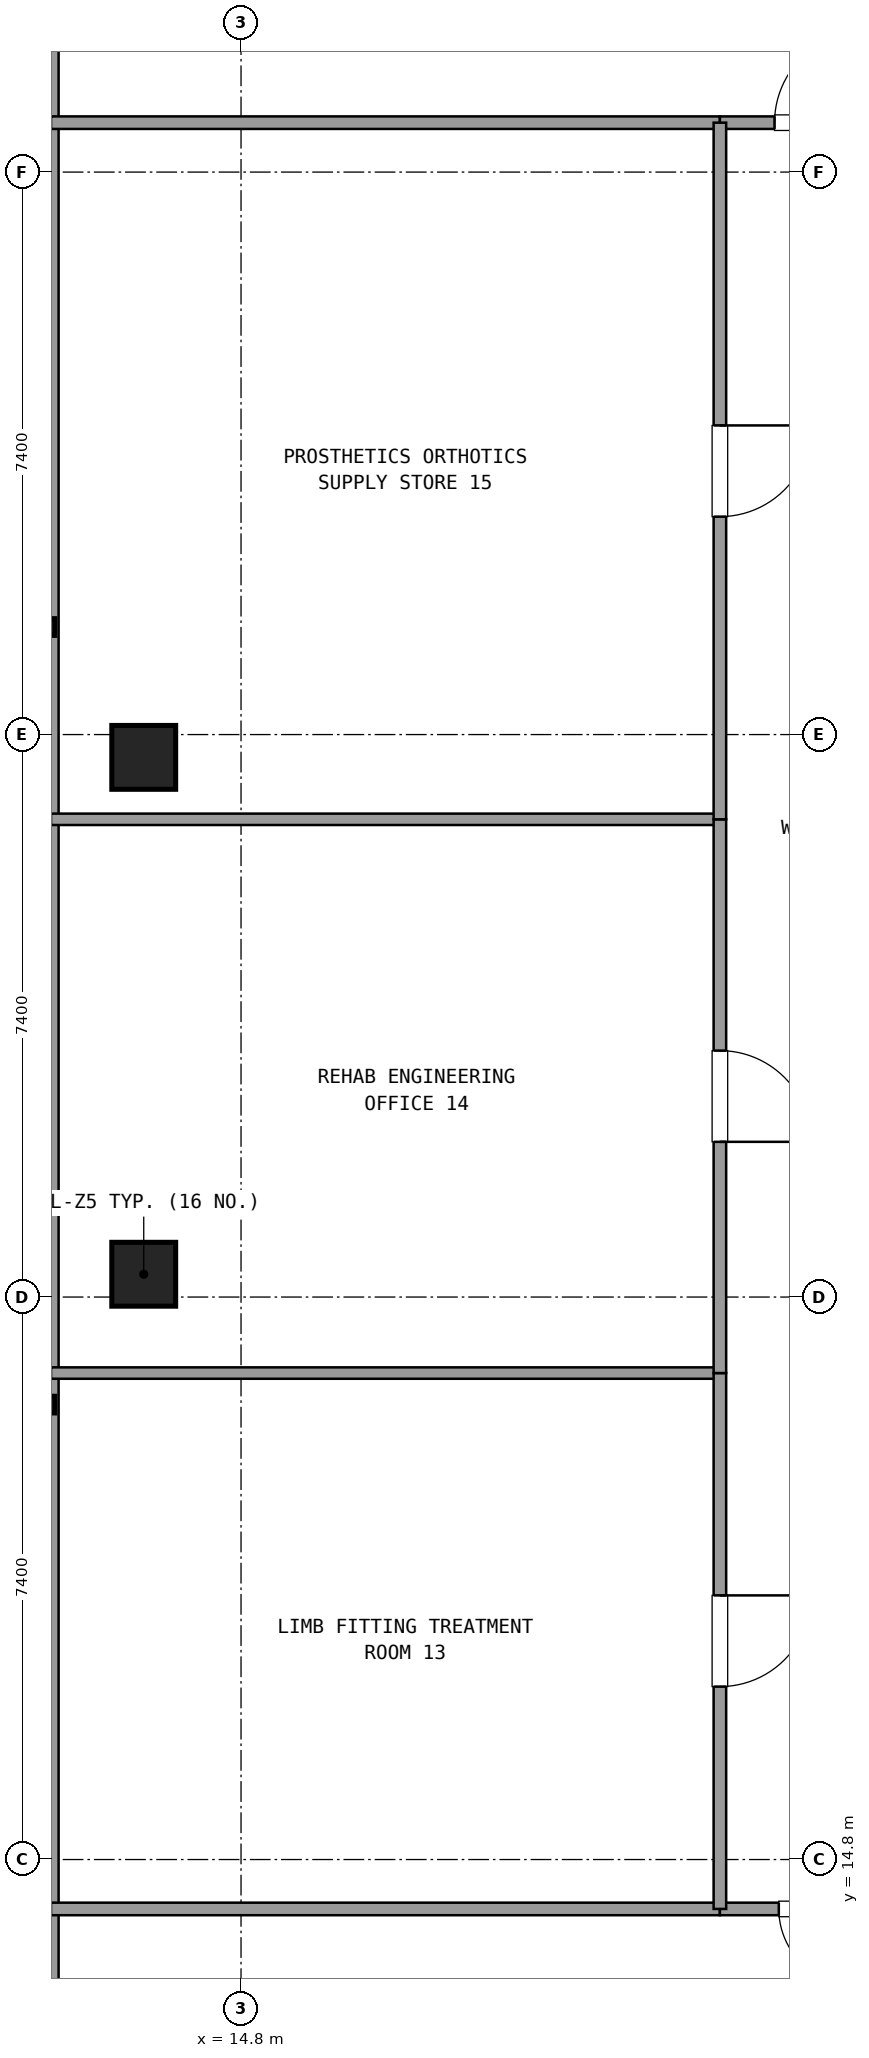
"""IFC4 building model, lengths in metres.
Left out: names, types, materials, properties, quantities, classifications, styles, units other than length and angle.
Written with IfcOpenShell. Run it as: python <this file> out.ifc"""

import sys

from ifc_helpers import new_model, si_unit, direction, frame, frame_2d, origin, origin_2d, place, context, subcontext, project, spatial, rectangle, extrude, element, fill, save


model = new_model("IFC4")
c1 = context("Model", 3, precision=1e-05, world=origin(), true_north=direction((0.0, 1.0)))
c2 = subcontext(c1, "Body", "Model", "MODEL_VIEW")
j1 = project(units=[si_unit("LENGTHUNIT", "METRE"), si_unit("PLANEANGLEUNIT", "RADIAN")], contexts=[c1])
p1 = place(None, origin())
s1 = spatial("IfcSite", under=j1, at=p1, CompositionType="ELEMENT")
p2 = place(p1, origin())
s2 = spatial("IfcBuilding", under=s1, at=p2, CompositionType="ELEMENT")
p3 = place(p2, frame((0.0, 0.0, 282.42)))
s3 = spatial("IfcBuildingStorey", under=s2, at=p3, CompositionType="ELEMENT", Elevation=282.42)
for number, where, z_axis, x_axis in (
    (1, (13.52, 22.5, 0.0), (0.0, 0.0, 1.0), (1.0, 0.0, 0.0)),
    (2, (13.52, 29.3, 0.0), (0.0, 0.0, 1.0), (1.0, 0.0, 0.0)),
):
    element("IfcColumn", number, at=place(p3, frame(where, z_axis=z_axis, x_axis=x_axis)), inside=s3, PredefinedType="COLUMN", context=c2, shape_type="SweptSolid", body=[
        extrude(rectangle(XDim=0.84, YDim=0.84, at=origin_2d()), origin(), (0.0, 0.0, 1.0), 3.6),
    ])
p4 = place(p3, frame((12.28, 41.245, 0.0), z_axis=(0.0, 0.0, 1.0), x_axis=(0.0, -1.0, 0.0)))
e3 = element("IfcWall", 3, at=p4, inside=s3, PredefinedType="SOLIDWALL", context=c2, shape_type="SweptSolid", body=[
    extrude(rectangle(XDim=30.69, YDim=0.24, at=frame_2d((15.345, 0.0))), origin(), (0.0, 0.0, 1.0), 0.85),
])
for number, where, z_axis, x_axis in (
    (4, (12.3, 37.65, 0.0), (0.0, 0.0, 1.0), (1.0, 0.0, 0.0)),
    (5, (12.3, 14.15, 0.0), (0.0, 0.0, 1.0), (1.0, 0.0, 0.0)),
):
    element("IfcWall", number, at=place(p3, frame(where, z_axis=z_axis, x_axis=x_axis)), inside=s3, PredefinedType="PARTITIONING", context=c2, shape_type="SweptSolid", body=[
        extrude(rectangle(XDim=8.8, YDim=0.165, at=frame_2d((4.4, 0.0))), origin(), (0.0, 0.0, 1.0), 2.24),
    ])
p5 = place(p3, frame((21.1, 37.65, 0.0), z_axis=(0.0, 0.0, 1.0), x_axis=(1.0, 0.0, 0.0)))
e6 = element("IfcWall", 6, at=p5, inside=s3, PredefinedType="PARTITIONING", context=c2, shape_type="SweptSolid", body=[
    extrude(rectangle(XDim=2.639, YDim=0.165, at=frame_2d((1.319, 0.0))), origin(), (0.0, 0.0, 1.0), 2.24),
])
p6 = place(p5, frame((0.719, 0.0, 0.0)))
e7 = element("IfcOpeningElement", 7, at=p6, cuts=e6, PredefinedType="OPENING", context=c2, shape_type="SweptSolid", body=[
    extrude(rectangle(XDim=1.2, YDim=2.15, at=frame_2d((0.6, 1.075))), frame((0.0, 0.093, 0.0), z_axis=(0.0, -1.0, 0.0), x_axis=(1.0, 0.0, 0.0)), (0.0, 0.0, 1.0), 0.185),
])
p7 = place(p3, frame((21.1, 14.15, 0.0), z_axis=(0.0, 0.0, 1.0), x_axis=(1.0, 0.0, 0.0)))
e8 = element("IfcWall", 8, at=p7, inside=s3, PredefinedType="PARTITIONING", context=c2, shape_type="SweptSolid", body=[
    extrude(rectangle(XDim=2.55, YDim=0.165, at=frame_2d((1.275, 0.0))), origin(), (0.0, 0.0, 1.0), 2.24),
])
p8 = place(p7, frame((0.775, 0.0, 0.0)))
e9 = element("IfcOpeningElement", 9, at=p8, cuts=e8, PredefinedType="OPENING", context=c2, shape_type="SweptSolid", body=[
    extrude(rectangle(XDim=1.0, YDim=2.15, at=frame_2d((0.5, 1.075))), frame((0.0, 0.093, 0.0), z_axis=(0.0, -1.0, 0.0), x_axis=(1.0, 0.0, 0.0)), (0.0, 0.0, 1.0), 0.185),
])
p9 = place(p3, frame((21.1, 21.2, 0.0), z_axis=(0.0, 0.0, 1.0), x_axis=(-1.0, 0.0, 0.0)))
e10 = element("IfcWall", 10, at=p9, inside=s3, PredefinedType="PARTITIONING", context=c2, shape_type="SweptSolid", body=[
    extrude(rectangle(XDim=8.8, YDim=0.15, at=frame_2d((4.4, 0.0))), origin(), (0.0, 0.0, 1.0), 2.24),
])
p10 = place(p3, frame((21.1, 14.15, 0.0), z_axis=(0.0, 0.0, 1.0), x_axis=(0.0, 1.0, 0.0)))
e11 = element("IfcWall", 11, at=p10, inside=s3, PredefinedType="PARTITIONING", context=c2, shape_type="SweptSolid", body=[
    extrude(rectangle(XDim=7.05, YDim=0.165, at=frame_2d((3.525, 0.0))), origin(), (0.0, 0.0, 1.0), 2.24),
])
p11 = place(p10, frame((2.925, 0.0, 0.0)))
e12 = element("IfcOpeningElement", 12, at=p11, cuts=e11, PredefinedType="OPENING", context=c2, shape_type="SweptSolid", body=[
    extrude(rectangle(XDim=1.2, YDim=2.15, at=frame_2d((0.6, 1.075))), frame((0.0, 0.093, 0.0), z_axis=(0.0, -1.0, 0.0), x_axis=(1.0, 0.0, 0.0)), (0.0, 0.0, 1.0), 0.185),
])
p12 = place(p3, frame((21.1, 28.485, 0.0), z_axis=(0.0, 0.0, 1.0), x_axis=(-1.0, 0.0, 0.0)))
e13 = element("IfcWall", 13, at=p12, inside=s3, PredefinedType="PARTITIONING", context=c2, shape_type="SweptSolid", body=[
    extrude(rectangle(XDim=8.8, YDim=0.15, at=frame_2d((4.4, 0.0))), origin(), (0.0, 0.0, 1.0), 2.24),
])
p13 = place(p3, frame((21.1, 21.2, 0.0), z_axis=(0.0, 0.0, 1.0), x_axis=(0.0, 1.0, 0.0)))
e14 = element("IfcWall", 14, at=p13, inside=s3, PredefinedType="PARTITIONING", context=c2, shape_type="SweptSolid", body=[
    extrude(rectangle(XDim=7.285, YDim=0.165, at=frame_2d((3.643, 0.0))), origin(), (0.0, 0.0, 1.0), 2.24),
])
p14 = place(p13, frame((3.042, 0.0, 0.0)))
e15 = element("IfcOpeningElement", 15, at=p14, cuts=e14, PredefinedType="OPENING", context=c2, shape_type="SweptSolid", body=[
    extrude(rectangle(XDim=1.2, YDim=2.15, at=frame_2d((0.6, 1.075))), frame((0.0, 0.093, 0.0), z_axis=(0.0, -1.0, 0.0), x_axis=(1.0, 0.0, 0.0)), (0.0, 0.0, 1.0), 0.185),
])
p15 = place(p3, frame((21.1, 28.485, 0.0), z_axis=(0.0, 0.0, 1.0), x_axis=(0.0, 1.0, 0.0)))
e16 = element("IfcWall", 16, at=p15, inside=s3, PredefinedType="PARTITIONING", context=c2, shape_type="SweptSolid", body=[
    extrude(rectangle(XDim=9.165, YDim=0.165, at=frame_2d((4.583, 0.0))), origin(), (0.0, 0.0, 1.0), 2.24),
])
p16 = place(p15, frame((3.982, 0.0, 0.0)))
e17 = element("IfcOpeningElement", 17, at=p16, cuts=e16, PredefinedType="OPENING", context=c2, shape_type="SweptSolid", body=[
    extrude(rectangle(XDim=1.2, YDim=2.15, at=frame_2d((0.6, 1.075))), frame((0.0, 0.093, 0.0), z_axis=(0.0, -1.0, 0.0), x_axis=(1.0, 0.0, 0.0)), (0.0, 0.0, 1.0), 0.185),
])
p17 = place(p6, origin())
e18 = element("IfcDoor", 18, at=p17, inside=s3, OperationType="SINGLE_SWING_RIGHT", PredefinedType="DOOR", context=c2, shape_type="SweptSolid", body=[
    extrude(rectangle(XDim=1.2, YDim=2.15, at=frame_2d((0.6, 1.075))), frame((0.0, 0.025, 0.0), z_axis=(0.0, -1.0, 0.0), x_axis=(1.0, 0.0, 0.0)), (0.0, 0.0, 1.0), 0.05),
])
fill(e7, e18)
p18 = place(p8, frame((1.0, 0.0, 0.0), z_axis=(0.0, 0.0, 1.0), x_axis=(-1.0, 0.0, 0.0)))
e19 = element("IfcDoor", 19, at=p18, inside=s3, OperationType="SINGLE_SWING_RIGHT", PredefinedType="DOOR", context=c2, shape_type="SweptSolid", body=[
    extrude(rectangle(XDim=1.0, YDim=2.15, at=frame_2d((0.5, 1.075))), frame((0.0, 0.025, 0.0), z_axis=(0.0, -1.0, 0.0), x_axis=(1.0, 0.0, 0.0)), (0.0, 0.0, 1.0), 0.05),
])
fill(e9, e19)
p19 = place(p11, frame((1.2, 0.0, 0.0), z_axis=(0.0, 0.0, 1.0), x_axis=(-1.0, 0.0, 0.0)))
e20 = element("IfcDoor", 20, at=p19, inside=s3, OperationType="SINGLE_SWING_RIGHT", PredefinedType="DOOR", context=c2, shape_type="SweptSolid", body=[
    extrude(rectangle(XDim=1.2, YDim=2.15, at=frame_2d((0.6, 1.075))), frame((0.0, 0.025, 0.0), z_axis=(0.0, -1.0, 0.0), x_axis=(1.0, 0.0, 0.0)), (0.0, 0.0, 1.0), 0.05),
])
fill(e12, e20)
p20 = place(p14, frame((1.2, 0.0, 0.0), z_axis=(0.0, 0.0, 1.0), x_axis=(-1.0, 0.0, 0.0)))
e21 = element("IfcDoor", 21, at=p20, inside=s3, OperationType="SINGLE_SWING_LEFT", PredefinedType="DOOR", context=c2, shape_type="SweptSolid", body=[
    extrude(rectangle(XDim=1.2, YDim=2.15, at=frame_2d((0.6, 1.075))), frame((0.0, 0.025, 0.0), z_axis=(0.0, -1.0, 0.0), x_axis=(1.0, 0.0, 0.0)), (0.0, 0.0, 1.0), 0.05),
])
fill(e15, e21)
p21 = place(p16, frame((1.2, 0.0, 0.0), z_axis=(0.0, 0.0, 1.0), x_axis=(-1.0, 0.0, 0.0)))
e22 = element("IfcDoor", 22, at=p21, inside=s3, OperationType="SINGLE_SWING_RIGHT", PredefinedType="DOOR", context=c2, shape_type="SweptSolid", body=[
    extrude(rectangle(XDim=1.2, YDim=2.15, at=frame_2d((0.6, 1.075))), frame((0.0, 0.025, 0.0), z_axis=(0.0, -1.0, 0.0), x_axis=(1.0, 0.0, 0.0)), (0.0, 0.0, 1.0), 0.05),
])
fill(e17, e22)
save(model, sys.argv[1])
